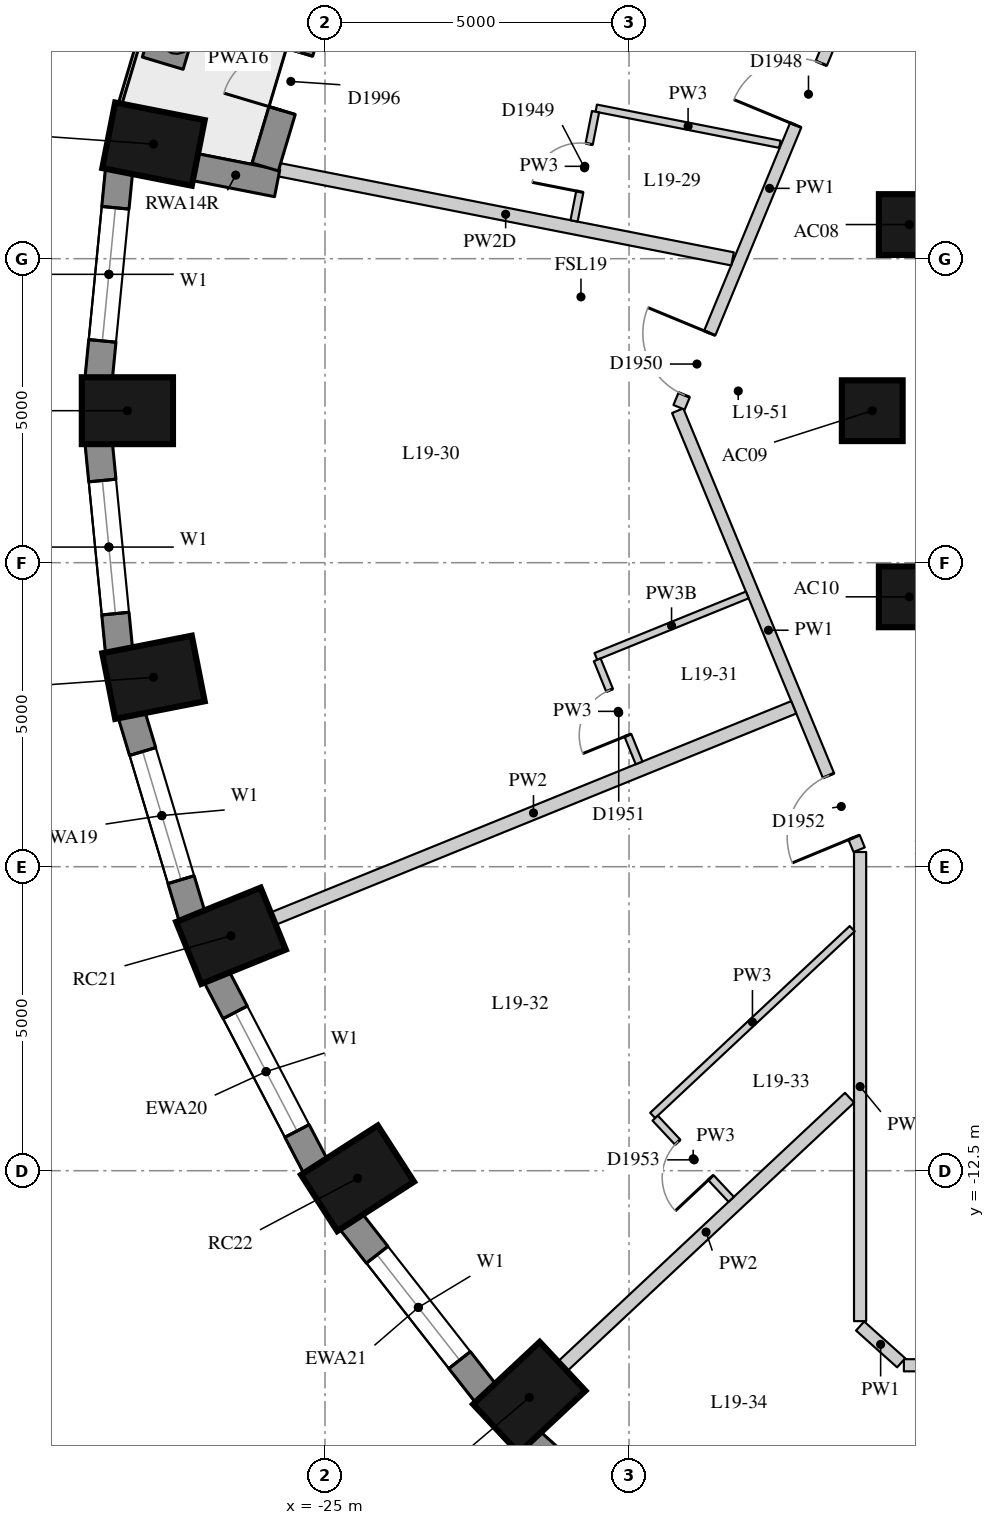
"""IFC4 building model, lengths in metres.
Left out: names, types, materials, properties, quantities, classifications, styles, units other than length and angle.
Written with IfcOpenShell. Run it as: python <this file> out.ifc"""

import sys

from ifc_helpers import new_model, si_unit, direction, frame, frame_2d, origin, origin_2d, place, context, subcontext, project, spatial, rectangle, extrude, element, fill, save


model = new_model("IFC4")
c1 = context("Model", 3, precision=1e-05, world=origin(), true_north=direction((0.0, 1.0)))
c2 = subcontext(c1, "Body", "Model", "MODEL_VIEW")
j1 = project(units=[si_unit("LENGTHUNIT", "METRE"), si_unit("PLANEANGLEUNIT", "RADIAN")], contexts=[c1])
p1 = place(None, origin())
s1 = spatial("IfcSite", under=j1, at=p1, CompositionType="ELEMENT")
p2 = place(p1, origin())
s2 = spatial("IfcBuilding", under=s1, at=p2, CompositionType="ELEMENT")
p3 = place(p2, frame((0.0, 0.0, 71.2)))
s3 = spatial("IfcBuildingStorey", under=s2, at=p3, CompositionType="ELEMENT", Elevation=71.2)
for number, where, z_axis, x_axis in (
    (1, (-27.821, 4.385, 0.0), (0.0, 0.0, 1.0), (-0.981, 0.193, 0.0)),
    (2, (-28.25, 0.0, 0.0), (0.0, 0.0, 1.0), (-1.0, 0.0, 0.0)),
    (3, (-27.821, -4.385, 0.0), (0.0, 0.0, 1.0), (-0.981, -0.193, 0.0)),
    (4, (-26.546, -8.636, 0.0), (0.0, 0.0, 1.0), (-0.927, -0.376, 0.0)),
    (5, (-24.465, -12.625, 0.0), (0.0, 0.0, 1.0), (-0.841, -0.541, 0.0)),
    (6, (-21.641, -16.23, 0.0), (0.0, 0.0, 1.0), (-0.73, -0.683, 0.0)),
):
    element("IfcColumn", number, at=place(p3, frame(where, z_axis=z_axis, x_axis=x_axis)), inside=s3, PredefinedType="COLUMN", context=c2, shape_type="SweptSolid", body=[
        extrude(rectangle(XDim=1.5, YDim=1.1, at=origin_2d()), origin(), (0.0, 0.0, 1.0), 3.3),
    ])
for number, where, z_axis, x_axis in (
    (7, (-15.391, 3.062, 0.0), (0.0, 0.0, 1.0), (1.0, 0.0, 0.0)),
    (8, (-16.0, 0.0, 0.0), (0.0, 0.0, 1.0), (1.0, 0.0, 0.0)),
    (9, (-15.391, -3.062, 0.0), (0.0, 0.0, 1.0), (1.0, 0.0, 0.0)),
):
    element("IfcColumn", number, at=place(p3, frame(where, z_axis=z_axis, x_axis=x_axis)), inside=s3, PredefinedType="COLUMN", context=c2, shape_type="SweptSolid", body=[
        extrude(rectangle(XDim=1.0, YDim=1.0, at=origin_2d()), origin(), (0.0, 0.0, 1.0), 3.3),
    ])
p4 = place(p3, frame((-28.387, 3.956, 0.0), z_axis=(0.0, 0.0, 1.0), x_axis=(-0.097389581596, -0.995246336038, 0.0)))
e10 = element("IfcWall", 10, at=p4, inside=s3, PredefinedType="SOLIDWALL", context=c2, shape_type="SweptSolid", body=[
    extrude(rectangle(XDim=3.442, YDim=0.45, at=frame_2d((1.721, 0.0))), origin(), (0.0, 0.0, 1.0), 3.02),
])
p5 = place(p4, frame((0.621, 0.0, 0.4)))
e11 = element("IfcOpeningElement", 11, at=p5, cuts=e10, PredefinedType="OPENING", context=c2, shape_type="SweptSolid", body=[
    extrude(rectangle(XDim=2.2, YDim=1.75, at=frame_2d((1.1, 0.875))), frame((0.0, 0.235, 0.0), z_axis=(0.0, -1.0, 0.0), x_axis=(1.0, 0.0, 0.0)), (0.0, 0.0, 1.0), 0.47),
])
p6 = place(p3, frame((-28.722, -0.53, 0.0), z_axis=(0.0, 0.0, 1.0), x_axis=(0.097389581596, -0.995246336038, 0.0)))
e12 = element("IfcWall", 12, at=p6, inside=s3, PredefinedType="SOLIDWALL", context=c2, shape_type="SweptSolid", body=[
    extrude(rectangle(XDim=3.442, YDim=0.45, at=frame_2d((1.721, 0.0))), origin(), (0.0, 0.0, 1.0), 3.02),
])
p7 = place(p6, frame((0.621, 0.0, 0.4)))
e13 = element("IfcOpeningElement", 13, at=p7, cuts=e12, PredefinedType="OPENING", context=c2, shape_type="SweptSolid", body=[
    extrude(rectangle(XDim=2.2, YDim=1.75, at=frame_2d((1.1, 0.875))), frame((0.0, 0.235, 0.0), z_axis=(0.0, -1.0, 0.0), x_axis=(1.0, 0.0, 0.0)), (0.0, 0.0, 1.0), 0.47),
])
p8 = place(p3, frame((-28.182, -4.996, 0.0), z_axis=(0.0, 0.0, 1.0), x_axis=(0.287064133733, -0.957911364963, 0.0)))
e14 = element("IfcWall", 14, at=p8, inside=s3, PredefinedType="SOLIDWALL", context=c2, shape_type="SweptSolid", body=[
    extrude(rectangle(XDim=3.473, YDim=0.45, at=frame_2d((1.737, 0.0))), origin(), (0.0, 0.0, 1.0), 3.02),
])
p9 = place(p8, frame((0.637, 0.0, 0.4)))
e15 = element("IfcOpeningElement", 15, at=p9, cuts=e14, PredefinedType="OPENING", context=c2, shape_type="SweptSolid", body=[
    extrude(rectangle(XDim=2.2, YDim=1.75, at=frame_2d((1.1, 0.875))), frame((0.0, 0.235, 0.0), z_axis=(0.0, -1.0, 0.0), x_axis=(1.0, 0.0, 0.0)), (0.0, 0.0, 1.0), 0.47),
])
p10 = place(p3, frame((-26.786, -9.305, 0.0), z_axis=(0.0, 0.0, 1.0), x_axis=(0.462492775226, -0.886623050041, 0.0)))
e16 = element("IfcWall", 16, at=p10, inside=s3, PredefinedType="SOLIDWALL", context=c2, shape_type="SweptSolid", body=[
    extrude(rectangle(XDim=3.532, YDim=0.45, at=frame_2d((1.766, 0.0))), origin(), (0.0, 0.0, 1.0), 3.02),
])
p11 = place(p10, frame((0.666, 0.0, 0.4)))
e17 = element("IfcOpeningElement", 17, at=p11, cuts=e16, PredefinedType="OPENING", context=c2, shape_type="SweptSolid", body=[
    extrude(rectangle(XDim=2.2, YDim=1.75, at=frame_2d((1.1, 0.875))), frame((0.0, 0.235, 0.0), z_axis=(0.0, -1.0, 0.0), x_axis=(1.0, 0.0, 0.0)), (0.0, 0.0, 1.0), 0.47),
])
p12 = place(p3, frame((-24.578, -13.328, 0.0), z_axis=(0.0, 0.0, 1.0), x_axis=(0.616661975264, -0.787228053529, 0.0)))
e18 = element("IfcWall", 18, at=p12, inside=s3, PredefinedType="SOLIDWALL", context=c2, shape_type="SweptSolid", body=[
    extrude(rectangle(XDim=3.61, YDim=0.45, at=frame_2d((1.805, 0.0))), origin(), (0.0, 0.0, 1.0), 3.02),
])
p13 = place(p12, frame((0.705, 0.0, 0.4)))
e19 = element("IfcOpeningElement", 19, at=p13, cuts=e18, PredefinedType="OPENING", context=c2, shape_type="SweptSolid", body=[
    extrude(rectangle(XDim=2.2, YDim=1.75, at=frame_2d((1.1, 0.875))), frame((0.0, 0.235, 0.0), z_axis=(0.0, -1.0, 0.0), x_axis=(1.0, 0.0, 0.0)), (0.0, 0.0, 1.0), 0.47),
])
p14 = place(p3, frame((-21.627, -16.943, 0.0), z_axis=(0.0, 0.0, 1.0), x_axis=(0.745526233716, -0.66647628228, 0.0)))
e20 = element("IfcWall", 20, at=p14, inside=s3, PredefinedType="SOLIDWALL", context=c2, shape_type="SweptSolid", body=[
    extrude(rectangle(XDim=3.697, YDim=0.45, at=frame_2d((1.848, 0.0))), origin(), (0.0, 0.0, 1.0), 3.02),
])
p15 = place(p14, frame((0.749, 0.0, 0.4)))
e21 = element("IfcOpeningElement", 21, at=p15, cuts=e20, PredefinedType="OPENING", context=c2, shape_type="SweptSolid", body=[
    extrude(rectangle(XDim=2.2, YDim=1.75, at=frame_2d((1.1, 0.875))), frame((0.0, 0.235, 0.0), z_axis=(0.0, -1.0, 0.0), x_axis=(1.0, 0.0, 0.0)), (0.0, 0.0, 1.0), 0.47),
])
p16 = place(p3, frame((-27.151, 4.009, 0.0), z_axis=(0.0, 0.0, 1.0), x_axis=(0.981197182729, -0.1930080014, 0.0)))
e22 = element("IfcWall", 22, at=p16, inside=s3, PredefinedType="SOLIDWALL", context=c2, shape_type="SweptSolid", body=[
    extrude(rectangle(XDim=1.39, YDim=0.45, at=frame_2d((0.695, 0.0))), origin(), (0.0, 0.0, 1.0), 2.47),
])
p17 = place(p3, frame((-24.812, 7.925, 0.0), z_axis=(0.0, 0.0, 1.0), x_axis=(-0.286389028326, -0.95811341941, 0.0)))
e23 = element("IfcWall", 23, at=p17, inside=s3, PredefinedType="SOLIDWALL", context=c2, shape_type="SweptSolid", body=[
    extrude(rectangle(XDim=4.088, YDim=0.45, at=frame_2d((2.044, 0.0))), origin(), (0.0, 0.0, 1.0), 3.02),
])
p18 = place(p17, frame((0.969, 0.0, 0.4)))
e24 = element("IfcOpeningElement", 24, at=p18, cuts=e23, PredefinedType="OPENING", context=c2, shape_type="SweptSolid", body=[
    extrude(rectangle(XDim=1.0, YDim=1.75, at=frame_2d((0.5, 0.875))), frame((0.0, 0.235, 0.0), z_axis=(0.0, -1.0, 0.0), x_axis=(1.0, 0.0, 0.0)), (0.0, 0.0, 1.0), 0.47),
])
p19 = place(p17, frame((2.119, 0.0, 0.0)))
e25 = element("IfcOpeningElement", 25, at=p19, cuts=e23, PredefinedType="OPENING", context=c2, shape_type="SweptSolid", body=[
    extrude(rectangle(XDim=1.0, YDim=2.15, at=frame_2d((0.5, 1.075))), frame((0.0, 0.235, 0.0), z_axis=(0.0, -1.0, 0.0), x_axis=(1.0, 0.0, 0.0)), (0.0, 0.0, 1.0), 0.47),
])
p20 = place(p3, frame((-27.152, 7.439, 0.0), z_axis=(0.0, 0.0, 1.0), x_axis=(-0.287024312863, -0.957923297465, 0.0)))
e26 = element("IfcWall", 26, at=p20, inside=s3, PredefinedType="USERDEFINED", context=c2, shape_type="SweptSolid", body=[
    extrude(rectangle(XDim=1.8, YDim=0.7, at=frame_2d((0.9, 0.0))), origin(), (0.0, 0.0, 1.0), 0.75),
])
p21 = place(p3, frame((-7.9, -15.7, 0.0), z_axis=(0.0, 0.0, 1.0), x_axis=(-1.0, 0.0, 0.0)))
e27 = element("IfcWall", 27, at=p21, inside=s3, PredefinedType="PARTITIONING", context=c2, shape_type="SweptSolid", body=[
    extrude(rectangle(XDim=7.58, YDim=0.2, at=frame_2d((3.79, 0.0))), origin(), (0.0, 0.0, 1.0), 3.02),
])
p22 = place(p21, frame((6.054, 0.0, 0.0)))
e28 = element("IfcOpeningElement", 28, at=p22, cuts=e27, PredefinedType="OPENING", context=c2, shape_type="SweptSolid", body=[
    extrude(rectangle(XDim=1.1, YDim=2.1, at=frame_2d((0.55, 1.05))), frame((0.0, 0.11, 0.0), z_axis=(0.0, -1.0, 0.0), x_axis=(1.0, 0.0, 0.0)), (0.0, 0.0, 1.0), 0.22),
])
p23 = place(p21, frame((1.377, 0.0, 0.0)))
e29 = element("IfcOpeningElement", 29, at=p23, cuts=e27, PredefinedType="OPENING", context=c2, shape_type="SweptSolid", body=[
    extrude(rectangle(XDim=1.0, YDim=2.1, at=frame_2d((0.5, 1.05))), frame((0.0, 0.11, 0.0), z_axis=(0.0, -1.0, 0.0), x_axis=(1.0, 0.0, 0.0)), (0.0, 0.0, 1.0), 0.22),
])
p24 = place(p3, frame((-15.525, -15.66, 0.0), z_axis=(0.0, 0.0, 1.0), x_axis=(-0.744684787626, 0.667416337138, 0.0)))
e30 = element("IfcWall", 30, at=p24, inside=s3, PredefinedType="PARTITIONING", context=c2, shape_type="SweptSolid", body=[
    extrude(rectangle(XDim=0.907, YDim=0.2, at=frame_2d((0.453, 0.0))), origin(), (0.0, 0.0, 1.0), 3.02),
])
p25 = place(p3, frame((-16.2, -14.974, 0.0), z_axis=(0.0, 0.0, 1.0), x_axis=(0.0, 1.0, 0.0)))
e31 = element("IfcWall", 31, at=p25, inside=s3, PredefinedType="PARTITIONING", context=c2, shape_type="SweptSolid", body=[
    extrude(rectangle(XDim=7.716, YDim=0.2, at=frame_2d((3.858, 0.0))), origin(), (0.0, 0.0, 1.0), 3.02),
])
p26 = place(p3, frame((-16.215, -7.221, 0.0), z_axis=(0.0, 0.0, 1.0), x_axis=(-0.382000362846, 0.924162173423, 0.0)))
e32 = element("IfcWall", 32, at=p26, inside=s3, PredefinedType="PARTITIONING", context=c2, shape_type="SweptSolid", body=[
    extrude(rectangle(XDim=7.814, YDim=0.2, at=frame_2d((3.907, 0.0))), origin(), (0.0, 0.0, 1.0), 3.02),
])
p27 = place(p26, frame((0.22, 0.0, 0.0)))
e33 = element("IfcOpeningElement", 33, at=p27, cuts=e32, PredefinedType="OPENING", context=c2, shape_type="SweptSolid", body=[
    extrude(rectangle(XDim=1.1, YDim=2.1, at=frame_2d((0.55, 1.05))), frame((0.0, 0.11, 0.0), z_axis=(0.0, -1.0, 0.0), x_axis=(1.0, 0.0, 0.0)), (0.0, 0.0, 1.0), 0.22),
])
p28 = place(p3, frame((-19.177, 0.056, 0.0), z_axis=(0.0, 0.0, 1.0), x_axis=(0.382011450526, 0.924157590277, 0.0)))
e34 = element("IfcWall", 34, at=p28, inside=s3, PredefinedType="PARTITIONING", context=c2, shape_type="SweptSolid", body=[
    extrude(rectangle(XDim=7.794, YDim=0.2, at=frame_2d((3.897, 0.0))), origin(), (0.0, 0.0, 1.0), 3.02),
])
p29 = place(p28, frame((5.022, 0.0, 0.0)))
e35 = element("IfcOpeningElement", 35, at=p29, cuts=e34, PredefinedType="OPENING", context=c2, shape_type="SweptSolid", body=[
    extrude(rectangle(XDim=1.1, YDim=2.1, at=frame_2d((0.55, 1.05))), frame((0.0, 0.11, 0.0), z_axis=(0.0, -1.0, 0.0), x_axis=(1.0, 0.0, 0.0)), (0.0, 0.0, 1.0), 0.22),
])
p30 = place(p28, frame((0.22, 0.0, 0.0)))
e36 = element("IfcOpeningElement", 36, at=p30, cuts=e34, PredefinedType="OPENING", context=c2, shape_type="SweptSolid", body=[
    extrude(rectangle(XDim=1.1, YDim=2.1, at=frame_2d((0.55, 1.05))), frame((0.0, 0.11, 0.0), z_axis=(0.0, -1.0, 0.0), x_axis=(1.0, 0.0, 0.0)), (0.0, 0.0, 1.0), 0.22),
])
p31 = place(p3, frame((-25.761, 3.964, 0.0), z_axis=(0.0, 0.0, 1.0), x_axis=(0.981212489184, -0.192930171486, 0.0)))
e37 = element("IfcWall", 37, at=p31, inside=s3, PredefinedType="PARTITIONING", context=c2, shape_type="SweptSolid", body=[
    extrude(rectangle(XDim=7.606, YDim=0.22, at=frame_2d((3.803, 0.0))), origin(), (0.0, 0.0, 1.0), 2.47),
])
p32 = place(p3, frame((-25.851, -8.354, 0.0), z_axis=(0.0, 0.0, 1.0), x_axis=(0.926554383207, 0.376160836558, 0.0)))
e38 = element("IfcWall", 38, at=p32, inside=s3, PredefinedType="PARTITIONING", context=c2, shape_type="SweptSolid", body=[
    extrude(rectangle(XDim=9.238, YDim=0.22, at=frame_2d((4.619, 0.0))), origin(), (0.0, 0.0, 1.0), 3.02),
])
p33 = place(p3, frame((-21.093, -15.718, 0.0), z_axis=(0.0, 0.0, 1.0), x_axis=(0.730096357883, 0.68334420917, 0.0)))
e39 = element("IfcWall", 39, at=p33, inside=s3, PredefinedType="PARTITIONING", context=c2, shape_type="SweptSolid", body=[
    extrude(rectangle(XDim=6.465, YDim=0.22, at=frame_2d((3.232, 0.0))), origin(), (0.0, 0.0, 1.0), 3.02),
])
p34 = place(p3, frame((-17.518, 4.382, 0.0), z_axis=(0.0, 0.0, 1.0), x_axis=(-0.981212916867, 0.192927996342, 0.0)))
e40 = element("IfcWall", 40, at=p34, inside=s3, PredefinedType="PARTITIONING", context=c2, shape_type="SweptSolid", body=[
    extrude(rectangle(XDim=3.079, YDim=0.12, at=frame_2d((1.54, 0.0))), origin(), (0.0, 0.0, 1.0), 3.02),
])
p35 = place(p3, frame((-18.056, -3.031, 0.0), z_axis=(0.0, 0.0, 1.0), x_axis=(-0.926540804766, -0.376194281061, 0.0)))
e41 = element("IfcWall", 41, at=p35, inside=s3, PredefinedType="PARTITIONING", context=c2, shape_type="SweptSolid", body=[
    extrude(rectangle(XDim=2.688, YDim=0.12, at=frame_2d((1.344, 0.0))), origin(), (0.0, 0.0, 1.0), 2.47),
])
p36 = place(p3, frame((-16.329, -8.52, 0.0), z_axis=(0.0, 0.0, 1.0), x_axis=(-0.730102689118, -0.68333744471, 0.0)))
e42 = element("IfcWall", 42, at=p36, inside=s3, PredefinedType="PARTITIONING", context=c2, shape_type="SweptSolid", body=[
    extrude(rectangle(XDim=4.495, YDim=0.12, at=frame_2d((2.248, 0.0))), origin(), (0.0, 0.0, 1.0), 3.02),
])
p37 = place(p3, frame((-20.551, 4.917, 0.0), z_axis=(0.0, 0.0, 1.0), x_axis=(-0.19288291118, -0.981221780524, 0.0)))
e43 = element("IfcWall", 43, at=p37, inside=s3, PredefinedType="PARTITIONING", context=c2, shape_type="SweptSolid", body=[
    extrude(rectangle(XDim=1.83, YDim=0.12, at=frame_2d((0.915, 0.0))), origin(), (0.0, 0.0, 1.0), 3.02),
])
p38 = place(p37, frame((0.54, 0.0, 0.0)))
e44 = element("IfcOpeningElement", 44, at=p38, cuts=e43, PredefinedType="OPENING", context=c2, shape_type="SweptSolid", body=[
    extrude(rectangle(XDim=0.8, YDim=2.1, at=frame_2d((0.4, 1.05))), frame((0.0, 0.07, 0.0), z_axis=(0.0, -1.0, 0.0), x_axis=(1.0, 0.0, 0.0)), (0.0, 0.0, 1.0), 0.14),
])
p39 = place(p3, frame((-20.523, -4.097, 0.0), z_axis=(0.0, 0.0, 1.0), x_axis=(0.376216010002, -0.92653198208, 0.0)))
e45 = element("IfcWall", 45, at=p39, inside=s3, PredefinedType="PARTITIONING", context=c2, shape_type="SweptSolid", body=[
    extrude(rectangle(XDim=1.83, YDim=0.12, at=frame_2d((0.915, 0.0))), origin(), (0.0, 0.0, 1.0), 3.02),
])
p40 = place(p39, frame((0.54, 0.0, 0.0)))
e46 = element("IfcOpeningElement", 46, at=p40, cuts=e45, PredefinedType="OPENING", context=c2, shape_type="SweptSolid", body=[
    extrude(rectangle(XDim=0.8, YDim=2.1, at=frame_2d((0.4, 1.05))), frame((0.0, 0.07, 0.0), z_axis=(0.0, -1.0, 0.0), x_axis=(1.0, 0.0, 0.0)), (0.0, 0.0, 1.0), 0.14),
])
p41 = place(p3, frame((-19.57, -11.635, 0.0), z_axis=(0.0, 0.0, 1.0), x_axis=(0.683306289544, -0.730131847456, 0.0)))
e47 = element("IfcWall", 47, at=p41, inside=s3, PredefinedType="PARTITIONING", context=c2, shape_type="SweptSolid", body=[
    extrude(rectangle(XDim=1.83, YDim=0.12, at=frame_2d((0.915, 0.0))), origin(), (0.0, 0.0, 1.0), 3.02),
])
p42 = place(p41, frame((0.54, 0.0, 0.0)))
e48 = element("IfcOpeningElement", 48, at=p42, cuts=e47, PredefinedType="OPENING", context=c2, shape_type="SweptSolid", body=[
    extrude(rectangle(XDim=0.8, YDim=2.1, at=frame_2d((0.4, 1.05))), frame((0.0, 0.07, 0.0), z_axis=(0.0, -1.0, 0.0), x_axis=(1.0, 0.0, 0.0)), (0.0, 0.0, 1.0), 0.14),
])
p43 = place(p5, origin())
e49 = element("IfcWindow", 49, at=p43, inside=s3, PartitioningType="SINGLE_PANEL", PredefinedType="WINDOW", context=c2, shape_type="SweptSolid", body=[
    extrude(rectangle(XDim=2.2, YDim=1.75, at=frame_2d((1.1, 0.875))), frame((0.0, 0.035, 0.0), z_axis=(0.0, -1.0, 0.0), x_axis=(1.0, 0.0, 0.0)), (0.0, 0.0, 1.0), 0.06),
])
fill(e11, e49)
p44 = place(p7, origin())
e50 = element("IfcWindow", 50, at=p44, inside=s3, PartitioningType="SINGLE_PANEL", PredefinedType="WINDOW", context=c2, shape_type="SweptSolid", body=[
    extrude(rectangle(XDim=2.2, YDim=1.75, at=frame_2d((1.1, 0.875))), frame((0.0, 0.035, 0.0), z_axis=(0.0, -1.0, 0.0), x_axis=(1.0, 0.0, 0.0)), (0.0, 0.0, 1.0), 0.06),
])
fill(e13, e50)
p45 = place(p9, origin())
e51 = element("IfcWindow", 51, at=p45, inside=s3, PartitioningType="SINGLE_PANEL", PredefinedType="WINDOW", context=c2, shape_type="SweptSolid", body=[
    extrude(rectangle(XDim=2.2, YDim=1.75, at=frame_2d((1.1, 0.875))), frame((0.0, 0.035, 0.0), z_axis=(0.0, -1.0, 0.0), x_axis=(1.0, 0.0, 0.0)), (0.0, 0.0, 1.0), 0.06),
])
fill(e15, e51)
p46 = place(p11, origin())
e52 = element("IfcWindow", 52, at=p46, inside=s3, PartitioningType="SINGLE_PANEL", PredefinedType="WINDOW", context=c2, shape_type="SweptSolid", body=[
    extrude(rectangle(XDim=2.2, YDim=1.75, at=frame_2d((1.1, 0.875))), frame((0.0, 0.035, 0.0), z_axis=(0.0, -1.0, 0.0), x_axis=(1.0, 0.0, 0.0)), (0.0, 0.0, 1.0), 0.06),
])
fill(e17, e52)
p47 = place(p13, origin())
e53 = element("IfcWindow", 53, at=p47, inside=s3, PartitioningType="SINGLE_PANEL", PredefinedType="WINDOW", context=c2, shape_type="SweptSolid", body=[
    extrude(rectangle(XDim=2.2, YDim=1.75, at=frame_2d((1.1, 0.875))), frame((0.0, 0.035, 0.0), z_axis=(0.0, -1.0, 0.0), x_axis=(1.0, 0.0, 0.0)), (0.0, 0.0, 1.0), 0.06),
])
fill(e19, e53)
p48 = place(p19, frame((1.0, 0.0, 0.0), z_axis=(0.0, 0.0, 1.0), x_axis=(-1.0, 0.0, 0.0)))
e54 = element("IfcDoor", 54, at=p48, inside=s3, OperationType="SINGLE_SWING_LEFT", PredefinedType="DOOR", context=c2, shape_type="SweptSolid", body=[
    extrude(rectangle(XDim=1.0, YDim=2.15, at=frame_2d((0.5, 1.075))), frame((0.0, 0.075, 0.0), z_axis=(0.0, -1.0, 0.0), x_axis=(1.0, 0.0, 0.0)), (0.0, 0.0, 1.0), 0.05),
])
fill(e25, e54)
p49 = place(p29, origin())
e55 = element("IfcDoor", 55, at=p49, inside=s3, OperationType="SINGLE_SWING_LEFT", PredefinedType="DOOR", context=c2, shape_type="SweptSolid", body=[
    extrude(rectangle(XDim=1.1, YDim=2.1, at=frame_2d((0.55, 1.05))), frame((0.0, 0.025, 0.0), z_axis=(0.0, -1.0, 0.0), x_axis=(1.0, 0.0, 0.0)), (0.0, 0.0, 1.0), 0.05),
])
fill(e35, e55)
p50 = place(p38, origin())
e56 = element("IfcDoor", 56, at=p50, inside=s3, OperationType="SINGLE_SWING_LEFT", PredefinedType="DOOR", context=c2, shape_type="SweptSolid", body=[
    extrude(rectangle(XDim=0.8, YDim=2.1, at=frame_2d((0.4, 1.05))), frame((0.0, 0.025, 0.0), z_axis=(0.0, -1.0, 0.0), x_axis=(1.0, 0.0, 0.0)), (0.0, 0.0, 1.0), 0.05),
])
fill(e44, e56)
p51 = place(p30, origin())
e57 = element("IfcDoor", 57, at=p51, inside=s3, OperationType="SINGLE_SWING_RIGHT", PredefinedType="DOOR", context=c2, shape_type="SweptSolid", body=[
    extrude(rectangle(XDim=1.1, YDim=2.1, at=frame_2d((0.55, 1.05))), frame((0.0, 0.025, 0.0), z_axis=(0.0, -1.0, 0.0), x_axis=(1.0, 0.0, 0.0)), (0.0, 0.0, 1.0), 0.05),
])
fill(e36, e57)
p52 = place(p40, origin())
e58 = element("IfcDoor", 58, at=p52, inside=s3, OperationType="SINGLE_SWING_LEFT", PredefinedType="DOOR", context=c2, shape_type="SweptSolid", body=[
    extrude(rectangle(XDim=0.8, YDim=2.1, at=frame_2d((0.4, 1.05))), frame((0.0, 0.025, 0.0), z_axis=(0.0, -1.0, 0.0), x_axis=(1.0, 0.0, 0.0)), (0.0, 0.0, 1.0), 0.05),
])
fill(e46, e58)
p53 = place(p27, origin())
e59 = element("IfcDoor", 59, at=p53, inside=s3, OperationType="SINGLE_SWING_LEFT", PredefinedType="DOOR", context=c2, shape_type="SweptSolid", body=[
    extrude(rectangle(XDim=1.1, YDim=2.1, at=frame_2d((0.55, 1.05))), frame((0.0, 0.025, 0.0), z_axis=(0.0, -1.0, 0.0), x_axis=(1.0, 0.0, 0.0)), (0.0, 0.0, 1.0), 0.05),
])
fill(e33, e59)
p54 = place(p42, origin())
e60 = element("IfcDoor", 60, at=p54, inside=s3, OperationType="SINGLE_SWING_LEFT", PredefinedType="DOOR", context=c2, shape_type="SweptSolid", body=[
    extrude(rectangle(XDim=0.8, YDim=2.1, at=frame_2d((0.4, 1.05))), frame((0.0, 0.025, 0.0), z_axis=(0.0, -1.0, 0.0), x_axis=(1.0, 0.0, 0.0)), (0.0, 0.0, 1.0), 0.05),
])
fill(e48, e60)
save(model, sys.argv[1])
